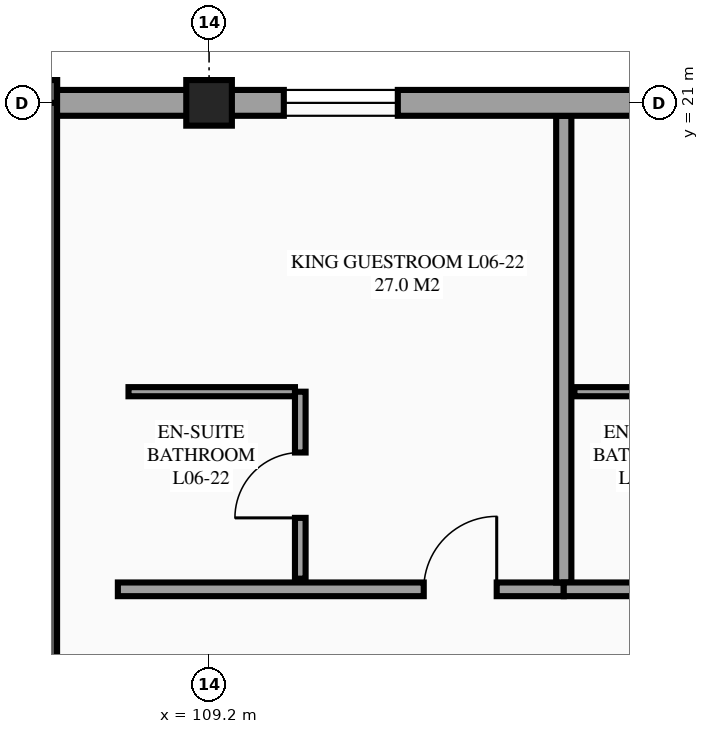
"""IFC4 building model, lengths in metres.
Left out: names, types, materials, properties, quantities, classifications, styles, units other than length and angle.
Written with IfcOpenShell. Run it as: python <this file> out.ifc"""

import sys

from ifc_helpers import new_model, si_unit, direction, frame, frame_2d, origin, origin_2d, place, context, subcontext, project, spatial, rectangle, extrude, element, fill, save


model = new_model("IFC4")
c1 = context("Model", 3, precision=1e-05, world=origin(), true_north=direction((0.0, 1.0)))
c2 = subcontext(c1, "Body", "Model", "MODEL_VIEW")
j1 = project(units=[si_unit("LENGTHUNIT", "METRE"), si_unit("PLANEANGLEUNIT", "RADIAN")], contexts=[c1])
p1 = place(None, origin())
s1 = spatial("IfcSite", under=j1, at=p1, CompositionType="ELEMENT")
p2 = place(p1, origin())
s2 = spatial("IfcBuilding", under=s1, at=p2, CompositionType="ELEMENT")
p3 = place(p2, frame((0.0, 0.0, 25.5)))
s3 = spatial("IfcBuildingStorey", under=s2, at=p3, CompositionType="ELEMENT", Elevation=25.5)
p4 = place(p3, frame((109.2, 21.0, 0.0), z_axis=(0.0, 0.0, 1.0), x_axis=(1.0, 0.0, 0.0)))
e1 = element("IfcColumn", 1, at=p4, inside=s3, PredefinedType="COLUMN", context=c2, shape_type="SweptSolid", body=[
    extrude(rectangle(XDim=0.6, YDim=0.6, at=origin_2d()), origin(), (0.0, 0.0, 1.0), 3.6),
])
p5 = place(p3, frame((107.05, 12.46, 0.0), z_axis=(0.0, 0.0, 1.0), x_axis=(0.0, 1.0, 0.0)))
e2 = element("IfcWall", 2, at=p5, inside=s3, PredefinedType="SHEAR", context=c2, shape_type="SweptSolid", body=[
    extrude(rectangle(XDim=8.84, YDim=0.3, at=frame_2d((4.42, 0.0))), origin(), (0.0, 0.0, 1.0), 3.6),
])
p6 = place(p3, frame((107.2, 21.15, 0.0), z_axis=(0.0, 0.0, 1.0), x_axis=(-1.0, 0.0, 0.0)))
e3 = element("IfcWall", 3, at=p6, inside=s3, PredefinedType="SHEAR", context=c2, shape_type="SweptSolid", body=[
    extrude(rectangle(XDim=5.2, YDim=0.3, at=frame_2d((2.6, 0.0))), origin(), (0.0, 0.0, 1.0), 3.6),
])
p7 = place(p3, frame((108.0, 14.6, 0.0), z_axis=(0.0, 0.0, 1.0), x_axis=(1.0, 0.0, 0.0)))
e4 = element("IfcWall", 4, at=p7, inside=s3, PredefinedType="PARTITIONING", context=c2, shape_type="SweptSolid", body=[
    extrude(rectangle(XDim=5.867, YDim=0.18, at=frame_2d((2.933, 0.0))), origin(), (0.0, 0.0, 1.0), 3.375),
])
p8 = place(p7, frame((4.024, 0.0, 0.0)))
e5 = element("IfcOpeningElement", 5, at=p8, cuts=e4, PredefinedType="OPENING", context=c2, shape_type="SweptSolid", body=[
    extrude(rectangle(XDim=0.96, YDim=2.15, at=frame_2d((0.48, 1.075))), frame((0.0, 0.1, 0.0), z_axis=(0.0, -1.0, 0.0), x_axis=(1.0, 0.0, 0.0)), (0.0, 0.0, 1.0), 0.2),
])
p9 = place(p3, frame((113.867, 14.69, 0.0), z_axis=(0.0, 0.0, 1.0), x_axis=(0.0, 1.0, 0.0)))
e6 = element("IfcWall", 6, at=p9, inside=s3, PredefinedType="PARTITIONING", context=c2, shape_type="SweptSolid", body=[
    extrude(rectangle(XDim=6.14, YDim=0.2, at=frame_2d((3.07, 0.0))), origin(), (0.0, 0.0, 1.0), 3.375),
])
p10 = place(p3, frame((110.4, 14.74, 0.0), z_axis=(0.0, 0.0, 1.0), x_axis=(0.0, 1.0, 0.0)))
e7 = element("IfcWall", 7, at=p10, inside=s3, PredefinedType="PARTITIONING", context=c2, shape_type="SweptSolid", body=[
    extrude(rectangle(XDim=2.46, YDim=0.14, at=frame_2d((1.23, 0.0))), origin(), (0.0, 0.0, 1.0), 3.375),
])
p11 = place(p10, frame((0.8, 0.0, 0.0)))
e8 = element("IfcOpeningElement", 8, at=p11, cuts=e7, PredefinedType="OPENING", context=c2, shape_type="SweptSolid", body=[
    extrude(rectangle(XDim=0.86, YDim=2.1, at=frame_2d((0.43, 1.05))), frame((0.0, 0.08, 0.0), z_axis=(0.0, -1.0, 0.0), x_axis=(1.0, 0.0, 0.0)), (0.0, 0.0, 1.0), 0.16),
])
p12 = place(p3, frame((108.14, 17.2, 0.0), z_axis=(0.0, 0.0, 1.0), x_axis=(1.0, 0.0, 0.0)))
e9 = element("IfcWall", 9, at=p12, inside=s3, PredefinedType="PARTITIONING", context=c2, shape_type="SweptSolid", body=[
    extrude(rectangle(XDim=2.19, YDim=0.12, at=frame_2d((1.095, 0.0))), origin(), (0.0, 0.0, 1.0), 3.375),
])
p13 = place(p3, frame((113.867, 14.6, 0.0), z_axis=(0.0, 0.0, 1.0), x_axis=(1.0, 0.0, 0.0)))
e10 = element("IfcWall", 10, at=p13, inside=s3, PredefinedType="PARTITIONING", context=c2, shape_type="SweptSolid", body=[
    extrude(rectangle(XDim=5.867, YDim=0.18, at=frame_2d((2.933, 0.0))), origin(), (0.0, 0.0, 1.0), 3.375),
])
p14 = place(p13, frame((4.024, 0.0, 0.0)))
e11 = element("IfcOpeningElement", 11, at=p14, cuts=e10, PredefinedType="OPENING", context=c2, shape_type="SweptSolid", body=[
    extrude(rectangle(XDim=0.96, YDim=2.15, at=frame_2d((0.48, 1.075))), frame((0.0, 0.1, 0.0), z_axis=(0.0, -1.0, 0.0), x_axis=(1.0, 0.0, 0.0)), (0.0, 0.0, 1.0), 0.2),
])
p15 = place(p3, frame((114.007, 17.2, 0.0), z_axis=(0.0, 0.0, 1.0), x_axis=(1.0, 0.0, 0.0)))
e12 = element("IfcWall", 12, at=p15, inside=s3, PredefinedType="PARTITIONING", context=c2, shape_type="SweptSolid", body=[
    extrude(rectangle(XDim=2.19, YDim=0.12, at=frame_2d((1.095, 0.0))), origin(), (0.0, 0.0, 1.0), 3.375),
])
p16 = place(p3, frame((117.6, 21.0, 0.0), z_axis=(0.0, 0.0, 1.0), x_axis=(-1.0, 0.0, 0.0)))
e13 = element("IfcWall", 13, at=p16, inside=s3, PredefinedType="STANDARD", context=c2, shape_type="SweptSolid", body=[
    extrude(rectangle(XDim=8.4, YDim=0.34, at=frame_2d((4.2, 0.0))), origin(), (0.0, 0.0, 1.0), 2.73),
])
p17 = place(p16, frame((5.917, 0.0, 0.85)))
e14 = element("IfcOpeningElement", 14, at=p17, cuts=e13, PredefinedType="OPENING", context=c2, shape_type="SweptSolid", body=[
    extrude(rectangle(XDim=1.5, YDim=1.5, at=frame_2d((0.75, 0.75))), frame((0.0, 0.18, 0.0), z_axis=(0.0, -1.0, 0.0), x_axis=(1.0, 0.0, 0.0)), (0.0, 0.0, 1.0), 0.36),
])
p18 = place(p16, frame((0.8, 0.0, 0.85)))
e15 = element("IfcOpeningElement", 15, at=p18, cuts=e13, PredefinedType="OPENING", context=c2, shape_type="SweptSolid", body=[
    extrude(rectangle(XDim=1.5, YDim=1.5, at=frame_2d((0.75, 0.75))), frame((0.0, 0.18, 0.0), z_axis=(0.0, -1.0, 0.0), x_axis=(1.0, 0.0, 0.0)), (0.0, 0.0, 1.0), 0.36),
])
p19 = place(p3, frame((109.2, 21.0, 0.0), z_axis=(0.0, 0.0, 1.0), x_axis=(-1.0, 0.0, 0.0)))
e16 = element("IfcWall", 16, at=p19, inside=s3, PredefinedType="STANDARD", context=c2, shape_type="SweptSolid", body=[
    extrude(rectangle(XDim=2.0, YDim=0.34, at=frame_2d((1.0, 0.0))), origin(), (0.0, 0.0, 1.0), 2.63),
])
p20 = place(p17, origin())
e17 = element("IfcWindow", 17, at=p20, inside=s3, PartitioningType="SINGLE_PANEL", PredefinedType="WINDOW", context=c2, shape_type="SweptSolid", body=[
    extrude(rectangle(XDim=1.5, YDim=1.5, at=frame_2d((0.75, 0.75))), frame((0.0, 0.03, 0.0), z_axis=(0.0, -1.0, 0.0), x_axis=(1.0, 0.0, 0.0)), (0.0, 0.0, 1.0), 0.06),
])
fill(e14, e17)
p21 = place(p8, origin())
e18 = element("IfcDoor", 18, at=p21, inside=s3, OperationType="SINGLE_SWING_RIGHT", PredefinedType="DOOR", context=c2, shape_type="SweptSolid", body=[
    extrude(rectangle(XDim=0.96, YDim=2.15, at=frame_2d((0.48, 1.075))), frame((0.0, 0.025, 0.0), z_axis=(0.0, -1.0, 0.0), x_axis=(1.0, 0.0, 0.0)), (0.0, 0.0, 1.0), 0.05),
])
fill(e5, e18)
p22 = place(p11, origin())
e19 = element("IfcDoor", 19, at=p22, inside=s3, OperationType="SINGLE_SWING_LEFT", PredefinedType="DOOR", context=c2, shape_type="SweptSolid", body=[
    extrude(rectangle(XDim=0.86, YDim=2.1, at=frame_2d((0.43, 1.05))), frame((0.0, 0.025, 0.0), z_axis=(0.0, -1.0, 0.0), x_axis=(1.0, 0.0, 0.0)), (0.0, 0.0, 1.0), 0.05),
])
fill(e8, e19)
save(model, sys.argv[1])
